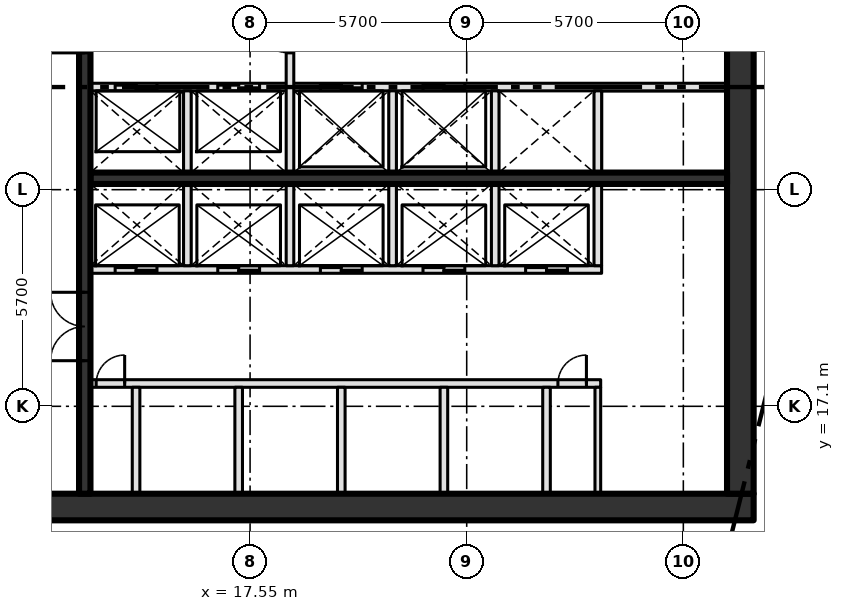
"""IFC4 building model, lengths in metres.
Left out: names, types, materials, properties, quantities, classifications, styles, units other than length and angle.
Written with IfcOpenShell. Run it as: python <this file> out.ifc"""

import sys

from ifc_helpers import new_model, si_unit, direction, frame, frame_2d, origin, place, context, subcontext, project, spatial, rectangle, extrude, element, fill, save


model = new_model("IFC4")
c1 = context("Model", 3, precision=1e-05, world=origin(), true_north=direction((0.0, 1.0)))
c2 = subcontext(c1, "Body", "Model", "MODEL_VIEW")
j1 = project(units=[si_unit("LENGTHUNIT", "METRE"), si_unit("PLANEANGLEUNIT", "RADIAN")], contexts=[c1])
p1 = place(None, origin())
s1 = spatial("IfcSite", under=j1, at=p1, CompositionType="ELEMENT")
p2 = place(p1, origin())
s2 = spatial("IfcBuilding", under=s1, at=p2, CompositionType="ELEMENT")
p3 = place(p2, frame((0.0, 0.0, 280.2)))
s3 = spatial("IfcBuildingStorey", under=s2, at=p3, CompositionType="ELEMENT", Elevation=280.2)
p4 = place(p3, frame((8.0, 14.45, -0.3), z_axis=(0.0, 0.0, 1.0), x_axis=(1.0, 0.0, 0.0)))
e1 = element("IfcWall", 1, at=p4, inside=s3, PredefinedType="SHEAR", context=c2, shape_type="SweptSolid", body=[
    extrude(rectangle(XDim=22.8, YDim=0.7, at=frame_2d((11.4, 0.0))), origin(), (0.0, 0.0, 1.0), 4.05),
])
p5 = place(p4, frame((2.3, 0.0, 0.3)))
e2 = element("IfcOpeningElement", 2, at=p5, cuts=e1, PredefinedType="OPENING", context=c2, shape_type="SweptSolid", body=[
    extrude(rectangle(XDim=1.8, YDim=2.1, at=frame_2d((0.9, 1.05))), frame((0.0, 0.36, 0.0), z_axis=(0.0, -1.0, 0.0), x_axis=(1.0, 0.0, 0.0)), (0.0, 0.0, 1.0), 0.72),
])
p6 = place(p3, frame((30.45, 14.8, -0.3), z_axis=(0.0, 0.0, 1.0), x_axis=(0.0, 1.0, 0.0)))
e3 = element("IfcWall", 3, at=p6, inside=s3, PredefinedType="SHEAR", context=c2, shape_type="SweptSolid", body=[
    extrude(rectangle(XDim=20.9, YDim=0.7, at=frame_2d((10.45, 0.0))), origin(), (0.0, 0.0, 1.0), 4.05),
])
p7 = place(p3, frame((13.35, 17.7, 0.0), z_axis=(0.0, 0.0, 1.0), x_axis=(1.0, 0.0, 0.0)))
e4 = element("IfcWall", 4, at=p7, inside=s3, PredefinedType="SOLIDWALL", context=c2, shape_type="SweptSolid", body=[
    extrude(rectangle(XDim=13.425, YDim=0.2, at=frame_2d((6.712, 0.0))), origin(), (0.0, 0.0, 1.0), 3.75),
])
p8 = place(p7, frame((0.15, 0.0, 0.0)))
e5 = element("IfcOpeningElement", 5, at=p8, cuts=e4, PredefinedType="OPENING", context=c2, shape_type="SweptSolid", body=[
    extrude(rectangle(XDim=0.75, YDim=2.1, at=frame_2d((0.375, 1.05))), frame((0.0, 0.11, 0.0), z_axis=(0.0, -1.0, 0.0), x_axis=(1.0, 0.0, 0.0)), (0.0, 0.0, 1.0), 0.22),
])
p9 = place(p7, frame((12.3, 0.0, 0.0)))
e6 = element("IfcOpeningElement", 6, at=p9, cuts=e4, PredefinedType="OPENING", context=c2, shape_type="SweptSolid", body=[
    extrude(rectangle(XDim=0.75, YDim=2.1, at=frame_2d((0.375, 1.05))), frame((0.0, 0.11, 0.0), z_axis=(0.0, -1.0, 0.0), x_axis=(1.0, 0.0, 0.0)), (0.0, 0.0, 1.0), 0.22),
])
p10 = place(p3, frame((13.35, 20.7, 0.0), z_axis=(0.0, 0.0, 1.0), x_axis=(1.0, 0.0, 0.0)))
e7 = element("IfcWall", 7, at=p10, inside=s3, PredefinedType="SOLIDWALL", context=c2, shape_type="SweptSolid", body=[
    extrude(rectangle(XDim=13.45, YDim=0.2, at=frame_2d((6.725, 0.0))), origin(), (0.0, 0.0, 1.0), 3.75),
])
p11 = place(p10, frame((0.65, 0.0, 0.0)))
e8 = element("IfcOpeningElement", 8, at=p11, cuts=e7, PredefinedType="OPENING", context=c2, shape_type="SweptSolid", body=[
    extrude(rectangle(XDim=1.1, YDim=2.1, at=frame_2d((0.55, 1.05))), frame((0.0, 0.11, 0.0), z_axis=(0.0, -1.0, 0.0), x_axis=(1.0, 0.0, 0.0)), (0.0, 0.0, 1.0), 0.22),
])
p12 = place(p10, frame((3.35, 0.0, 0.0)))
e9 = element("IfcOpeningElement", 9, at=p12, cuts=e7, PredefinedType="OPENING", context=c2, shape_type="SweptSolid", body=[
    extrude(rectangle(XDim=1.1, YDim=2.1, at=frame_2d((0.55, 1.05))), frame((0.0, 0.11, 0.0), z_axis=(0.0, -1.0, 0.0), x_axis=(1.0, 0.0, 0.0)), (0.0, 0.0, 1.0), 0.22),
])
p13 = place(p10, frame((6.05, 0.0, 0.0)))
e10 = element("IfcOpeningElement", 10, at=p13, cuts=e7, PredefinedType="OPENING", context=c2, shape_type="SweptSolid", body=[
    extrude(rectangle(XDim=1.1, YDim=2.1, at=frame_2d((0.55, 1.05))), frame((0.0, 0.11, 0.0), z_axis=(0.0, -1.0, 0.0), x_axis=(1.0, 0.0, 0.0)), (0.0, 0.0, 1.0), 0.22),
])
p14 = place(p10, frame((8.75, 0.0, 0.0)))
e11 = element("IfcOpeningElement", 11, at=p14, cuts=e7, PredefinedType="OPENING", context=c2, shape_type="SweptSolid", body=[
    extrude(rectangle(XDim=1.1, YDim=2.1, at=frame_2d((0.55, 1.05))), frame((0.0, 0.11, 0.0), z_axis=(0.0, -1.0, 0.0), x_axis=(1.0, 0.0, 0.0)), (0.0, 0.0, 1.0), 0.22),
])
p15 = place(p10, frame((11.45, 0.0, 0.0)))
e12 = element("IfcOpeningElement", 12, at=p15, cuts=e7, PredefinedType="OPENING", context=c2, shape_type="SweptSolid", body=[
    extrude(rectangle(XDim=1.1, YDim=2.1, at=frame_2d((0.55, 1.05))), frame((0.0, 0.11, 0.0), z_axis=(0.0, -1.0, 0.0), x_axis=(1.0, 0.0, 0.0)), (0.0, 0.0, 1.0), 0.22),
])
p16 = place(p3, frame((13.35, 23.1, 0.0), z_axis=(0.0, 0.0, 1.0), x_axis=(1.0, 0.0, 0.0)))
e13 = element("IfcWall", 13, at=p16, inside=s3, PredefinedType="SHEAR", context=c2, shape_type="SweptSolid", body=[
    extrude(rectangle(XDim=16.75, YDim=0.3, at=frame_2d((8.375, 0.0))), origin(), (0.0, 0.0, 1.0), 3.75),
])
p17 = place(p3, frame((13.35, 25.5, 0.0), z_axis=(0.0, 0.0, 1.0), x_axis=(1.0, 0.0, 0.0)))
e14 = element("IfcWall", 14, at=p17, inside=s3, PredefinedType="SOLIDWALL", context=c2, shape_type="SweptSolid", body=[
    extrude(rectangle(XDim=16.75, YDim=0.2, at=frame_2d((8.375, 0.0))), origin(), (0.0, 0.0, 1.0), 3.75),
])
p18 = place(p17, frame((0.65, 0.0, 0.0)))
e15 = element("IfcOpeningElement", 15, at=p18, cuts=e14, PredefinedType="OPENING", context=c2, shape_type="SweptSolid", body=[
    extrude(rectangle(XDim=1.1, YDim=2.1, at=frame_2d((0.55, 1.05))), frame((0.0, 0.11, 0.0), z_axis=(0.0, -1.0, 0.0), x_axis=(1.0, 0.0, 0.0)), (0.0, 0.0, 1.0), 0.22),
])
p19 = place(p17, frame((3.35, 0.0, 0.0)))
e16 = element("IfcOpeningElement", 16, at=p19, cuts=e14, PredefinedType="OPENING", context=c2, shape_type="SweptSolid", body=[
    extrude(rectangle(XDim=1.1, YDim=2.1, at=frame_2d((0.55, 1.05))), frame((0.0, 0.11, 0.0), z_axis=(0.0, -1.0, 0.0), x_axis=(1.0, 0.0, 0.0)), (0.0, 0.0, 1.0), 0.22),
])
p20 = place(p17, frame((6.05, 0.0, 0.0)))
e17 = element("IfcOpeningElement", 17, at=p20, cuts=e14, PredefinedType="OPENING", context=c2, shape_type="SweptSolid", body=[
    extrude(rectangle(XDim=1.1, YDim=2.1, at=frame_2d((0.55, 1.05))), frame((0.0, 0.11, 0.0), z_axis=(0.0, -1.0, 0.0), x_axis=(1.0, 0.0, 0.0)), (0.0, 0.0, 1.0), 0.22),
])
p21 = place(p17, frame((8.75, 0.0, 0.0)))
e18 = element("IfcOpeningElement", 18, at=p21, cuts=e14, PredefinedType="OPENING", context=c2, shape_type="SweptSolid", body=[
    extrude(rectangle(XDim=1.1, YDim=2.1, at=frame_2d((0.55, 1.05))), frame((0.0, 0.11, 0.0), z_axis=(0.0, -1.0, 0.0), x_axis=(1.0, 0.0, 0.0)), (0.0, 0.0, 1.0), 0.22),
])
p22 = place(p3, frame((13.2, 14.8, 0.0), z_axis=(0.0, 0.0, 1.0), x_axis=(0.0, 1.0, 0.0)))
e19 = element("IfcWall", 19, at=p22, inside=s3, PredefinedType="SHEAR", context=c2, shape_type="SweptSolid", body=[
    extrude(rectangle(XDim=20.9, YDim=0.3, at=frame_2d((10.45, 0.0))), origin(), (0.0, 0.0, 1.0), 3.75),
])
p23 = place(p22, frame((3.5, 0.0, 0.0)))
e20 = element("IfcOpeningElement", 20, at=p23, cuts=e19, PredefinedType="OPENING", context=c2, shape_type="SweptSolid", body=[
    extrude(rectangle(XDim=1.8, YDim=2.1, at=frame_2d((0.9, 1.05))), frame((0.0, 0.16, 0.0), z_axis=(0.0, -1.0, 0.0), x_axis=(1.0, 0.0, 0.0)), (0.0, 0.0, 1.0), 0.32),
])
p24 = place(p22, frame((11.6, 0.0, 0.0)))
e21 = element("IfcOpeningElement", 21, at=p24, cuts=e19, PredefinedType="OPENING", context=c2, shape_type="SweptSolid", body=[
    extrude(rectangle(XDim=1.2, YDim=2.1, at=frame_2d((0.6, 1.05))), frame((0.0, 0.16, 0.0), z_axis=(0.0, -1.0, 0.0), x_axis=(1.0, 0.0, 0.0)), (0.0, 0.0, 1.0), 0.32),
])
p25 = place(p3, frame((14.55, 14.8, 0.0), z_axis=(0.0, 0.0, 1.0), x_axis=(0.0, 1.0, 0.0)))
e22 = element("IfcWall", 22, at=p25, inside=s3, PredefinedType="SOLIDWALL", context=c2, shape_type="SweptSolid", body=[
    extrude(rectangle(XDim=2.8, YDim=0.2, at=frame_2d((1.4, 0.0))), origin(), (0.0, 0.0, 1.0), 3.75),
])
p26 = place(p3, frame((15.9, 20.8, 0.0), z_axis=(0.0, 0.0, 1.0), x_axis=(0.0, 1.0, 0.0)))
e23 = element("IfcWall", 23, at=p26, inside=s3, PredefinedType="SOLIDWALL", context=c2, shape_type="SweptSolid", body=[
    extrude(rectangle(XDim=4.6, YDim=0.2, at=frame_2d((2.3, 0.0))), origin(), (0.0, 0.0, 1.0), 3.75),
])
p27 = place(p3, frame((17.25, 14.8, 0.0), z_axis=(0.0, 0.0, 1.0), x_axis=(0.0, 1.0, 0.0)))
e24 = element("IfcWall", 24, at=p27, inside=s3, PredefinedType="SOLIDWALL", context=c2, shape_type="SweptSolid", body=[
    extrude(rectangle(XDim=2.8, YDim=0.2, at=frame_2d((1.4, 0.0))), origin(), (0.0, 0.0, 1.0), 3.75),
])
p28 = place(p3, frame((18.6, 20.8, 0.0), z_axis=(0.0, 0.0, 1.0), x_axis=(0.0, 1.0, 0.0)))
e25 = element("IfcWall", 25, at=p28, inside=s3, PredefinedType="SOLIDWALL", context=c2, shape_type="SweptSolid", body=[
    extrude(rectangle(XDim=7.6, YDim=0.2, at=frame_2d((3.8, 0.0))), origin(), (0.0, 0.0, 1.0), 3.75),
])
p29 = place(p28, frame((5.6, 0.0, 0.0)))
e26 = element("IfcOpeningElement", 26, at=p29, cuts=e25, PredefinedType="OPENING", context=c2, shape_type="SweptSolid", body=[
    extrude(rectangle(XDim=1.2, YDim=2.1, at=frame_2d((0.6, 1.05))), frame((0.0, 0.11, 0.0), z_axis=(0.0, -1.0, 0.0), x_axis=(1.0, 0.0, 0.0)), (0.0, 0.0, 1.0), 0.22),
])
p30 = place(p3, frame((19.95, 14.8, 0.0), z_axis=(0.0, 0.0, 1.0), x_axis=(0.0, 1.0, 0.0)))
e27 = element("IfcWall", 27, at=p30, inside=s3, PredefinedType="SOLIDWALL", context=c2, shape_type="SweptSolid", body=[
    extrude(rectangle(XDim=2.8, YDim=0.2, at=frame_2d((1.4, 0.0))), origin(), (0.0, 0.0, 1.0), 3.75),
])
p31 = place(p3, frame((21.3, 20.8, 0.0), z_axis=(0.0, 0.0, 1.0), x_axis=(0.0, 1.0, 0.0)))
e28 = element("IfcWall", 28, at=p31, inside=s3, PredefinedType="SOLIDWALL", context=c2, shape_type="SweptSolid", body=[
    extrude(rectangle(XDim=4.6, YDim=0.2, at=frame_2d((2.3, 0.0))), origin(), (0.0, 0.0, 1.0), 3.75),
])
p32 = place(p3, frame((22.65, 14.8, 0.0), z_axis=(0.0, 0.0, 1.0), x_axis=(0.0, 1.0, 0.0)))
e29 = element("IfcWall", 29, at=p32, inside=s3, PredefinedType="SOLIDWALL", context=c2, shape_type="SweptSolid", body=[
    extrude(rectangle(XDim=2.8, YDim=0.2, at=frame_2d((1.4, 0.0))), origin(), (0.0, 0.0, 1.0), 3.75),
])
p33 = place(p3, frame((24.0, 20.8, 0.0), z_axis=(0.0, 0.0, 1.0), x_axis=(0.0, 1.0, 0.0)))
e30 = element("IfcWall", 30, at=p33, inside=s3, PredefinedType="SOLIDWALL", context=c2, shape_type="SweptSolid", body=[
    extrude(rectangle(XDim=4.6, YDim=0.2, at=frame_2d((2.3, 0.0))), origin(), (0.0, 0.0, 1.0), 3.75),
])
p34 = place(p3, frame((25.35, 14.8, 0.0), z_axis=(0.0, 0.0, 1.0), x_axis=(0.0, 1.0, 0.0)))
e31 = element("IfcWall", 31, at=p34, inside=s3, PredefinedType="SOLIDWALL", context=c2, shape_type="SweptSolid", body=[
    extrude(rectangle(XDim=2.8, YDim=0.2, at=frame_2d((1.4, 0.0))), origin(), (0.0, 0.0, 1.0), 3.75),
])
p35 = place(p3, frame((26.7, 14.8, 0.0), z_axis=(0.0, 0.0, 1.0), x_axis=(0.0, 1.0, 0.0)))
e32 = element("IfcWall", 32, at=p35, inside=s3, PredefinedType="PARTITIONING", context=c2, shape_type="SweptSolid", body=[
    extrude(rectangle(XDim=2.8, YDim=0.15, at=frame_2d((1.4, 0.0))), origin(), (0.0, 0.0, 1.0), 3.75),
])
p36 = place(p3, frame((26.7, 20.8, 0.0), z_axis=(0.0, 0.0, 1.0), x_axis=(0.0, 1.0, 0.0)))
e33 = element("IfcWall", 33, at=p36, inside=s3, PredefinedType="SOLIDWALL", context=c2, shape_type="SweptSolid", body=[
    extrude(rectangle(XDim=4.6, YDim=0.2, at=frame_2d((2.3, 0.0))), origin(), (0.0, 0.0, 1.0), 3.75),
])
p37 = place(p11, origin())
e34 = element("IfcDoor", 34, at=p37, inside=s3, OperationType="SLIDING_TO_LEFT", PredefinedType="DOOR", context=c2, shape_type="SweptSolid", body=[
    extrude(rectangle(XDim=1.1, YDim=2.1, at=frame_2d((0.55, 1.05))), frame((0.0, 0.025, 0.0), z_axis=(0.0, -1.0, 0.0), x_axis=(1.0, 0.0, 0.0)), (0.0, 0.0, 1.0), 0.05),
])
fill(e8, e34)
p38 = place(p12, origin())
e35 = element("IfcDoor", 35, at=p38, inside=s3, OperationType="SLIDING_TO_LEFT", PredefinedType="DOOR", context=c2, shape_type="SweptSolid", body=[
    extrude(rectangle(XDim=1.1, YDim=2.1, at=frame_2d((0.55, 1.05))), frame((0.0, 0.025, 0.0), z_axis=(0.0, -1.0, 0.0), x_axis=(1.0, 0.0, 0.0)), (0.0, 0.0, 1.0), 0.05),
])
fill(e9, e35)
p39 = place(p13, origin())
e36 = element("IfcDoor", 36, at=p39, inside=s3, OperationType="SLIDING_TO_LEFT", PredefinedType="DOOR", context=c2, shape_type="SweptSolid", body=[
    extrude(rectangle(XDim=1.1, YDim=2.1, at=frame_2d((0.55, 1.05))), frame((0.0, 0.025, 0.0), z_axis=(0.0, -1.0, 0.0), x_axis=(1.0, 0.0, 0.0)), (0.0, 0.0, 1.0), 0.05),
])
fill(e10, e36)
p40 = place(p14, origin())
e37 = element("IfcDoor", 37, at=p40, inside=s3, OperationType="SLIDING_TO_LEFT", PredefinedType="DOOR", context=c2, shape_type="SweptSolid", body=[
    extrude(rectangle(XDim=1.1, YDim=2.1, at=frame_2d((0.55, 1.05))), frame((0.0, 0.025, 0.0), z_axis=(0.0, -1.0, 0.0), x_axis=(1.0, 0.0, 0.0)), (0.0, 0.0, 1.0), 0.05),
])
fill(e11, e37)
p41 = place(p15, origin())
e38 = element("IfcDoor", 38, at=p41, inside=s3, OperationType="SLIDING_TO_LEFT", PredefinedType="DOOR", context=c2, shape_type="SweptSolid", body=[
    extrude(rectangle(XDim=1.1, YDim=2.1, at=frame_2d((0.55, 1.05))), frame((0.0, 0.025, 0.0), z_axis=(0.0, -1.0, 0.0), x_axis=(1.0, 0.0, 0.0)), (0.0, 0.0, 1.0), 0.05),
])
fill(e12, e38)
p42 = place(p18, origin())
e39 = element("IfcDoor", 39, at=p42, inside=s3, OperationType="SLIDING_TO_LEFT", PredefinedType="DOOR", context=c2, shape_type="SweptSolid", body=[
    extrude(rectangle(XDim=1.1, YDim=2.1, at=frame_2d((0.55, 1.05))), frame((0.0, 0.025, 0.0), z_axis=(0.0, -1.0, 0.0), x_axis=(1.0, 0.0, 0.0)), (0.0, 0.0, 1.0), 0.05),
])
fill(e15, e39)
p43 = place(p19, origin())
e40 = element("IfcDoor", 40, at=p43, inside=s3, OperationType="SLIDING_TO_LEFT", PredefinedType="DOOR", context=c2, shape_type="SweptSolid", body=[
    extrude(rectangle(XDim=1.1, YDim=2.1, at=frame_2d((0.55, 1.05))), frame((0.0, 0.025, 0.0), z_axis=(0.0, -1.0, 0.0), x_axis=(1.0, 0.0, 0.0)), (0.0, 0.0, 1.0), 0.05),
])
fill(e16, e40)
p44 = place(p20, origin())
e41 = element("IfcDoor", 41, at=p44, inside=s3, OperationType="SLIDING_TO_LEFT", PredefinedType="DOOR", context=c2, shape_type="SweptSolid", body=[
    extrude(rectangle(XDim=1.1, YDim=2.1, at=frame_2d((0.55, 1.05))), frame((0.0, 0.025, 0.0), z_axis=(0.0, -1.0, 0.0), x_axis=(1.0, 0.0, 0.0)), (0.0, 0.0, 1.0), 0.05),
])
fill(e17, e41)
p45 = place(p21, origin())
e42 = element("IfcDoor", 42, at=p45, inside=s3, OperationType="SLIDING_TO_LEFT", PredefinedType="DOOR", context=c2, shape_type="SweptSolid", body=[
    extrude(rectangle(XDim=1.1, YDim=2.1, at=frame_2d((0.55, 1.05))), frame((0.0, 0.025, 0.0), z_axis=(0.0, -1.0, 0.0), x_axis=(1.0, 0.0, 0.0)), (0.0, 0.0, 1.0), 0.05),
])
fill(e18, e42)
p46 = place(p8, origin())
e43 = element("IfcDoor", 43, at=p46, inside=s3, OperationType="SINGLE_SWING_RIGHT", PredefinedType="DOOR", context=c2, shape_type="SweptSolid", body=[
    extrude(rectangle(XDim=0.75, YDim=2.1, at=frame_2d((0.375, 1.05))), frame((0.0, 0.025, 0.0), z_axis=(0.0, -1.0, 0.0), x_axis=(1.0, 0.0, 0.0)), (0.0, 0.0, 1.0), 0.05),
])
fill(e5, e43)
p47 = place(p9, origin())
e44 = element("IfcDoor", 44, at=p47, inside=s3, OperationType="SINGLE_SWING_RIGHT", PredefinedType="DOOR", context=c2, shape_type="SweptSolid", body=[
    extrude(rectangle(XDim=0.75, YDim=2.1, at=frame_2d((0.375, 1.05))), frame((0.0, 0.025, 0.0), z_axis=(0.0, -1.0, 0.0), x_axis=(1.0, 0.0, 0.0)), (0.0, 0.0, 1.0), 0.05),
])
fill(e6, e44)
p48 = place(p23, origin())
e45 = element("IfcDoor", 45, at=p48, inside=s3, OperationType="DOUBLE_DOOR_SINGLE_SWING", PredefinedType="DOOR", context=c2, shape_type="SweptSolid", body=[
    extrude(rectangle(XDim=1.8, YDim=2.1, at=frame_2d((0.9, 1.05))), frame((0.0, 0.025, 0.0), z_axis=(0.0, -1.0, 0.0), x_axis=(1.0, 0.0, 0.0)), (0.0, 0.0, 1.0), 0.05),
])
fill(e20, e45)
save(model, sys.argv[1])
